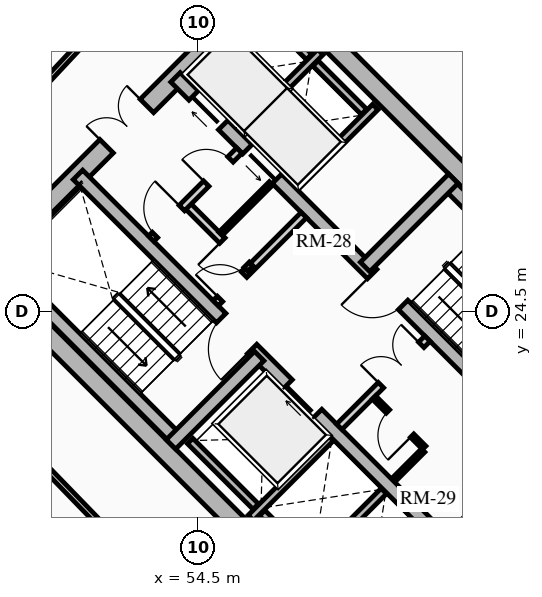
"""IFC4 building model, lengths in metres.
Left out: names, types, materials, properties, quantities, classifications, styles, units other than length and angle.
Written with IfcOpenShell. Run it as: python <this file> out.ifc"""

import sys

from ifc_helpers import new_model, si_unit, direction, frame, frame_2d, origin, place, context, subcontext, project, spatial, rectangle, extrude, source, transform, mapped, element, fill, save


model = new_model("IFC4")
c1 = context("Model", 3, precision=1e-05, world=origin(), true_north=direction((0.0, 1.0)))
c2 = subcontext(c1, "Body", "Model", "MODEL_VIEW")
j1 = project(units=[si_unit("LENGTHUNIT", "METRE"), si_unit("PLANEANGLEUNIT", "RADIAN")], contexts=[c1])
p1 = place(None, origin())
s1 = spatial("IfcSite", under=j1, at=p1, CompositionType="ELEMENT")
p2 = place(p1, origin())
s2 = spatial("IfcBuilding", under=s1, at=p2, CompositionType="ELEMENT")
p3 = place(p2, frame((0.0, 0.0, 54.01)))
s3 = spatial("IfcBuildingStorey", under=s2, at=p3, CompositionType="ELEMENT", Elevation=54.01)
for number, where, z_axis, x_axis in (
    (1, (58.773, 15.661, 0.0), (0.0, 0.0, 1.0), (-0.707, 0.707, 0.0)),
    (2, (66.339, 23.227, 0.0), (0.0, 0.0, 1.0), (-0.707, 0.707, 0.0)),
):
    element("IfcWall", number, at=place(p3, frame(where, z_axis=z_axis, x_axis=x_axis)), inside=s3, PredefinedType="SHEAR", context=c2, shape_type="SweptSolid", body=[
        extrude(rectangle(XDim=14.3, YDim=0.5, at=frame_2d((7.15, 0.0))), origin(), (0.0, 0.0, 1.0), 2.91),
    ])
p4 = place(p3, frame((58.596, 15.838, 0.0), z_axis=(0.0, 0.0, 1.0), x_axis=(0.707106781187, 0.707106781187, 0.0)))
e3 = element("IfcWall", 3, at=p4, inside=s3, PredefinedType="SHEAR", context=c2, shape_type="SweptSolid", body=[
    extrude(rectangle(XDim=10.7, YDim=0.5, at=frame_2d((5.35, 0.0))), origin(), (0.0, 0.0, 1.0), 2.91),
])
m1 = source(origin(), c2, "Body", "SweptSolid", [
    extrude(rectangle(XDim=1.5, YDim=2.02, at=frame_2d((0.75, 1.01))), frame((0.0, 0.26, 0.0), z_axis=(0.0, -1.0, 0.0), x_axis=(1.0, 0.0, 0.0)), (0.0, 0.0, 1.0), 0.52),
])
p5 = place(p4, frame((5.45, 0.0, 0.0)))
e4 = element("IfcOpeningElement", 4, at=p5, cuts=e3, PredefinedType="OPENING", context=c2, shape_type="MappedRepresentation", body=[
    mapped(m1, transform((0.0, 0.0, 0.0), x_axis=(1.0, 0.0, 0.0), y_axis=(0.0, 1.0, 0.0), z_axis=(0.0, 0.0, 1.0), scale=1.0)),
])
p6 = place(p3, frame((48.838, 25.596, 0.0), z_axis=(0.0, 0.0, 1.0), x_axis=(0.707106781187, 0.707106781187, 0.0)))
e5 = element("IfcWall", 5, at=p6, inside=s3, PredefinedType="SHEAR", context=c2, shape_type="SweptSolid", body=[
    extrude(rectangle(XDim=10.7, YDim=0.5, at=frame_2d((5.35, 0.0))), origin(), (0.0, 0.0, 1.0), 2.91),
])
p7 = place(p6, frame((4.6, 0.0, 0.0)))
e6 = element("IfcOpeningElement", 6, at=p7, cuts=e5, PredefinedType="OPENING", context=c2, shape_type="MappedRepresentation", body=[
    mapped(m1, transform((0.0, 0.0, 0.0), x_axis=(1.0, 0.0, 0.0), y_axis=(0.0, 1.0, 0.0), z_axis=(0.0, 0.0, 1.0), scale=1.0)),
])
p8 = place(p3, frame((61.096, 18.338, 0.0), z_axis=(0.0, 0.0, 1.0), x_axis=(-0.707106781187, 0.707106781187, 0.0)))
e7 = element("IfcWall", 7, at=p8, inside=s3, PredefinedType="SHEAR", context=c2, shape_type="SweptSolid", body=[
    extrude(rectangle(XDim=13.8, YDim=0.35, at=frame_2d((6.9, 0.0))), origin(), (0.0, 0.0, 1.0), 2.91),
])
m2 = source(origin(), c2, "Body", "SweptSolid", [
    extrude(rectangle(XDim=1.1, YDim=2.015, at=frame_2d((0.55, 1.007))), frame((0.0, 0.185, 0.0), z_axis=(0.0, -1.0, 0.0), x_axis=(1.0, 0.0, 0.0)), (0.0, 0.0, 1.0), 0.37),
])
p9 = place(p8, frame((4.9, 0.0, 0.0)))
e8 = element("IfcOpeningElement", 8, at=p9, cuts=e7, PredefinedType="OPENING", context=c2, shape_type="MappedRepresentation", body=[
    mapped(m2, transform((0.0, 0.0, 0.0), x_axis=(1.0, 0.0, 0.0), y_axis=(0.0, 1.0, 0.0), z_axis=(0.0, 0.0, 1.0), scale=1.0)),
])
m3 = source(origin(), c2, "Body", "SweptSolid", [
    extrude(rectangle(XDim=1.15, YDim=2.02, at=frame_2d((0.575, 1.01))), frame((0.0, 0.185, 0.0), z_axis=(0.0, -1.0, 0.0), x_axis=(1.0, 0.0, 0.0)), (0.0, 0.0, 1.0), 0.37),
])
p10 = place(p8, frame((7.32, 0.0, 0.0)))
e9 = element("IfcOpeningElement", 9, at=p10, cuts=e7, PredefinedType="OPENING", context=c2, shape_type="MappedRepresentation", body=[
    mapped(m3, transform((0.0, 0.0, 0.0), x_axis=(1.0, 0.0, 0.0), y_axis=(0.0, 1.0, 0.0), z_axis=(0.0, 0.0, 1.0), scale=1.0)),
])
p11 = place(p3, frame((63.662, 20.904, 0.0), z_axis=(0.0, 0.0, 1.0), x_axis=(-0.707106781187, 0.707106781187, 0.0)))
e10 = element("IfcWall", 10, at=p11, inside=s3, PredefinedType="SHEAR", context=c2, shape_type="SweptSolid", body=[
    extrude(rectangle(XDim=13.8, YDim=0.35, at=frame_2d((6.9, 0.0))), origin(), (0.0, 0.0, 1.0), 2.91),
])
p12 = place(p11, frame((10.025, 0.0, 0.0)))
e11 = element("IfcOpeningElement", 11, at=p12, cuts=e10, PredefinedType="OPENING", context=c2, shape_type="MappedRepresentation", body=[
    mapped(m2, transform((0.0, 0.0, 0.0), x_axis=(1.0, 0.0, 0.0), y_axis=(0.0, 1.0, 0.0), z_axis=(0.0, 0.0, 1.0), scale=1.0)),
])
p13 = place(p11, frame((12.025, 0.0, 0.0)))
e12 = element("IfcOpeningElement", 12, at=p13, cuts=e10, PredefinedType="OPENING", context=c2, shape_type="MappedRepresentation", body=[
    mapped(m2, transform((0.0, 0.0, 0.0), x_axis=(1.0, 0.0, 0.0), y_axis=(0.0, 1.0, 0.0), z_axis=(0.0, 0.0, 1.0), scale=1.0)),
])
p14 = place(p11, frame((5.33, 0.0, 0.0)))
e13 = element("IfcOpeningElement", 13, at=p14, cuts=e10, PredefinedType="OPENING", context=c2, shape_type="MappedRepresentation", body=[
    mapped(m3, transform((0.0, 0.0, 0.0), x_axis=(1.0, 0.0, 0.0), y_axis=(0.0, 1.0, 0.0), z_axis=(0.0, 0.0, 1.0), scale=1.0)),
])
p15 = place(p3, frame((53.922, 21.141, 0.0), z_axis=(0.0, 0.0, 1.0), x_axis=(-0.707106781187, 0.707106781187, 0.0)))
e14 = element("IfcWall", 14, at=p15, inside=s3, PredefinedType="SHEAR", context=c2, shape_type="SweptSolid", body=[
    extrude(rectangle(XDim=6.745, YDim=0.35, at=frame_2d((3.373, 0.0))), origin(), (0.0, 0.0, 1.0), 2.91),
])
p16 = place(p3, frame((53.784, 21.003, 0.0), z_axis=(0.0, 0.0, 1.0), x_axis=(0.707106781187, 0.707106781187, 0.0)))
e15 = element("IfcWall", 15, at=p16, inside=s3, PredefinedType="SHEAR", context=c2, shape_type="SweptSolid", body=[
    extrude(rectangle(XDim=3.285, YDim=0.35, at=frame_2d((1.643, 0.0))), origin(), (0.0, 0.0, 1.0), 2.91),
])
p17 = place(p3, frame((65.847, 23.089, 0.0), z_axis=(0.0, 0.0, 1.0), x_axis=(-0.707106781187, 0.707106781187, 0.0)))
e16 = element("IfcWall", 16, at=p17, inside=s3, PredefinedType="SHEAR", context=c2, shape_type="SweptSolid", body=[
    extrude(rectangle(XDim=6.745, YDim=0.35, at=frame_2d((3.373, 0.0))), origin(), (0.0, 0.0, 1.0), 2.91),
])
p18 = place(p3, frame((58.893, 25.674, 0.0), z_axis=(0.0, 0.0, 1.0), x_axis=(0.707106781187, 0.707106781187, 0.0)))
e17 = element("IfcWall", 17, at=p18, inside=s3, PredefinedType="SHEAR", context=c2, shape_type="SweptSolid", body=[
    extrude(rectangle(XDim=3.285, YDim=0.35, at=frame_2d((1.643, 0.0))), origin(), (0.0, 0.0, 1.0), 2.91),
])
p19 = place(p3, frame((55.888, 19.069, 0.0), z_axis=(0.0, 0.0, 1.0), x_axis=(0.707106781187, 0.707106781187, 0.0)))
e18 = element("IfcWall", 18, at=p19, inside=s3, PredefinedType="SHEAR", context=c2, shape_type="SweptSolid", body=[
    extrude(rectangle(XDim=2.97, YDim=0.2, at=frame_2d((1.485, 0.0))), origin(), (0.0, 0.0, 1.0), 2.91),
])
p20 = place(p3, frame((56.015, 19.366, 0.0), z_axis=(0.0, 0.0, 1.0), x_axis=(-0.707106781187, 0.707106781187, 0.0)))
e19 = element("IfcWall", 19, at=p20, inside=s3, PredefinedType="SHEAR", context=c2, shape_type="SweptSolid", body=[
    extrude(rectangle(XDim=2.44, YDim=0.2, at=frame_2d((1.22, 0.0))), origin(), (0.0, 0.0, 1.0), 2.91),
])
p21 = place(p3, frame((57.284, 17.673, 0.0), z_axis=(0.0, 0.0, 1.0), x_axis=(0.707147878904, 0.70706568108, 0.0)))
e20 = element("IfcWall", 20, at=p21, inside=s3, PredefinedType="SHEAR", context=c2, shape_type="SweptSolid", body=[
    extrude(rectangle(XDim=2.97, YDim=0.2, at=frame_2d((1.485, 0.0))), origin(), (0.0, 0.0, 1.0), 2.91),
])
p22 = place(p3, frame((57.412, 17.97, 0.0), z_axis=(0.0, 0.0, 1.0), x_axis=(-0.707106781187, 0.707106781187, 0.0)))
e21 = element("IfcWall", 21, at=p22, inside=s3, PredefinedType="SHEAR", context=c2, shape_type="SweptSolid", body=[
    extrude(rectangle(XDim=1.735, YDim=0.2, at=frame_2d((0.867, 0.0))), origin(), (0.0, 0.0, 1.0), 2.91),
])
p23 = place(p3, frame((57.062, 27.781, 0.0), z_axis=(0.0, 0.0, 1.0), x_axis=(0.707106781187, 0.707106781187, 0.0)))
e22 = element("IfcWall", 22, at=p23, inside=s3, PredefinedType="SHEAR", context=c2, shape_type="SweptSolid", body=[
    extrude(rectangle(XDim=2.97, YDim=0.2, at=frame_2d((1.485, 0.0))), origin(), (0.0, 0.0, 1.0), 2.91),
])
p24 = place(p3, frame((55.615, 29.227, 0.0), z_axis=(0.0, 0.0, 1.0), x_axis=(0.707147878904, 0.70706568108, 0.0)))
e23 = element("IfcWall", 23, at=p24, inside=s3, PredefinedType="SHEAR", context=c2, shape_type="SweptSolid", body=[
    extrude(rectangle(XDim=2.97, YDim=0.2, at=frame_2d((1.485, 0.0))), origin(), (0.0, 0.0, 1.0), 2.91),
])
p25 = place(p3, frame((58.865, 29.754, 0.0), z_axis=(0.0, 0.0, 1.0), x_axis=(-0.707174411312, 0.707039144592, 0.0)))
e24 = element("IfcWall", 24, at=p25, inside=s3, PredefinedType="SHEAR", context=c2, shape_type="SweptSolid", body=[
    extrude(rectangle(XDim=1.805, YDim=0.2, at=frame_2d((0.902, 0.0))), origin(), (0.0, 0.0, 1.0), 2.91),
])
p26 = place(p3, frame((57.419, 31.2, 0.0), z_axis=(0.0, 0.0, 1.0), x_axis=(-0.707032117043, 0.707181437447, 0.0)))
e25 = element("IfcWall", 25, at=p26, inside=s3, PredefinedType="SHEAR", context=c2, shape_type="SweptSolid", body=[
    extrude(rectangle(XDim=1.635, YDim=0.2, at=frame_2d((0.817, 0.0))), origin(), (0.0, 0.0, 1.0), 2.91),
])
p27 = place(p3, frame((58.214, 21.467, 0.0), z_axis=(0.0, 0.0, 1.0), x_axis=(0.707106781187, 0.707106781187, 0.0)))
e26 = element("IfcWall", 26, at=p27, inside=s3, PredefinedType="PARTITIONING", context=c2, shape_type="SweptSolid", body=[
    extrude(rectangle(XDim=3.28, YDim=0.2, at=frame_2d((1.64, 0.0))), origin(), (0.0, 0.0, 1.0), 2.635),
])
m4 = source(origin(), c2, "Body", "SweptSolid", [
    extrude(rectangle(XDim=1.5, YDim=2.02, at=frame_2d((0.75, 1.01))), frame((0.0, 0.11, 0.0), z_axis=(0.0, -1.0, 0.0), x_axis=(1.0, 0.0, 0.0)), (0.0, 0.0, 1.0), 0.22),
])
p28 = place(p27, frame((1.55, 0.0, 0.0)))
e27 = element("IfcOpeningElement", 27, at=p28, cuts=e26, PredefinedType="OPENING", context=c2, shape_type="MappedRepresentation", body=[
    mapped(m4, transform((0.0, 0.0, 0.0), x_axis=(1.0, 0.0, 0.0), y_axis=(0.0, 1.0, 0.0), z_axis=(0.0, 0.0, 1.0), scale=1.0)),
])
p29 = place(p3, frame((54.961, 24.719, 0.0), z_axis=(0.0, 0.0, 1.0), x_axis=(0.707106781187, 0.707106781187, 0.0)))
e28 = element("IfcWall", 28, at=p29, inside=s3, PredefinedType="PARTITIONING", context=c2, shape_type="SweptSolid", body=[
    extrude(rectangle(XDim=3.28, YDim=0.2, at=frame_2d((1.64, 0.0))), origin(), (0.0, 0.0, 1.0), 2.635),
])
m5 = source(origin(), c2, "Body", "SweptSolid", [
    extrude(rectangle(XDim=0.9, YDim=2.005, at=frame_2d((0.45, 1.002))), frame((0.0, 0.11, 0.0), z_axis=(0.0, -1.0, 0.0), x_axis=(1.0, 0.0, 0.0)), (0.0, 0.0, 1.0), 0.22),
])
p30 = place(p29, frame((0.16, 0.0, 0.0)))
e29 = element("IfcOpeningElement", 29, at=p30, cuts=e28, PredefinedType="OPENING", context=c2, shape_type="MappedRepresentation", body=[
    mapped(m5, transform((0.0, 0.0, 0.0), x_axis=(1.0, 0.0, 0.0), y_axis=(0.0, 1.0, 0.0), z_axis=(0.0, 0.0, 1.0), scale=1.0)),
])
p31 = place(p3, frame((55.874, 25.631, 0.0), z_axis=(0.0, 0.0, 1.0), x_axis=(-0.707157639372, 0.707055919343, 0.0)))
e30 = element("IfcWall", 30, at=p31, inside=s3, PredefinedType="PARTITIONING", context=c2, shape_type="SweptSolid", body=[
    extrude(rectangle(XDim=2.4, YDim=0.2, at=frame_2d((1.2, 0.0))), origin(), (0.0, 0.0, 1.0), 2.635),
])
p32 = place(p31, frame((0.14, 0.0, 0.0)))
e31 = element("IfcOpeningElement", 31, at=p32, cuts=e30, PredefinedType="OPENING", context=c2, shape_type="MappedRepresentation", body=[
    mapped(m5, transform((0.0, 0.0, 0.0), x_axis=(1.0, 0.0, 0.0), y_axis=(0.0, 1.0, 0.0), z_axis=(0.0, 0.0, 1.0), scale=1.0)),
])
p33 = place(p3, frame((53.264, 26.416, 0.0), z_axis=(0.0, 0.0, 1.0), x_axis=(0.707106781187, 0.707106781187, 0.0)))
e32 = element("IfcWall", 32, at=p33, inside=s3, PredefinedType="PARTITIONING", context=c2, shape_type="SweptSolid", body=[
    extrude(rectangle(XDim=3.28, YDim=0.2, at=frame_2d((1.64, 0.0))), origin(), (0.0, 0.0, 1.0), 2.635),
])
m6 = source(origin(), c2, "Body", "SweptSolid", [
    extrude(rectangle(XDim=1.0, YDim=2.015, at=frame_2d((0.5, 1.007))), frame((0.0, 0.11, 0.0), z_axis=(0.0, -1.0, 0.0), x_axis=(1.0, 0.0, 0.0)), (0.0, 0.0, 1.0), 0.22),
])
p34 = place(p33, frame((0.14, 0.0, 0.0)))
e33 = element("IfcOpeningElement", 33, at=p34, cuts=e32, PredefinedType="OPENING", context=c2, shape_type="MappedRepresentation", body=[
    mapped(m6, transform((0.0, 0.0, 0.0), x_axis=(1.0, 0.0, 0.0), y_axis=(0.0, 1.0, 0.0), z_axis=(0.0, 0.0, 1.0), scale=1.0)),
])
p35 = place(p33, frame((2.05, 0.0, 0.0)))
e34 = element("IfcOpeningElement", 34, at=p35, cuts=e32, PredefinedType="OPENING", context=c2, shape_type="MappedRepresentation", body=[
    mapped(m5, transform((0.0, 0.0, 0.0), x_axis=(1.0, 0.0, 0.0), y_axis=(0.0, 1.0, 0.0), z_axis=(0.0, 0.0, 1.0), scale=1.0)),
])
p36 = place(p3, frame((60.448, 20.915, 0.0), z_axis=(0.0, 0.0, 1.0), x_axis=(-0.707106781187, 0.707106781187, 0.0)))
e35 = element("IfcWall", 35, at=p36, inside=s3, PredefinedType="PARTITIONING", context=c2, shape_type="SweptSolid", body=[
    extrude(rectangle(XDim=1.87, YDim=0.125, at=frame_2d((0.935, 0.0))), origin(), (0.0, 0.0, 1.0), 2.635),
])
m7 = source(origin(), c2, "Body", "SweptSolid", [
    extrude(rectangle(XDim=0.9, YDim=2.005, at=frame_2d((0.45, 1.002))), frame((0.0, 0.073, 0.0), z_axis=(0.0, -1.0, 0.0), x_axis=(1.0, 0.0, 0.0)), (0.0, 0.0, 1.0), 0.145),
])
p37 = place(p36, frame((0.45, 0.0, 0.0)))
e36 = element("IfcOpeningElement", 36, at=p37, cuts=e35, PredefinedType="OPENING", context=c2, shape_type="MappedRepresentation", body=[
    mapped(m7, transform((0.0, 0.0, 0.0), x_axis=(1.0, 0.0, 0.0), y_axis=(0.0, 1.0, 0.0), z_axis=(0.0, 0.0, 1.0), scale=1.0)),
])
p38 = place(p3, frame((59.643, 20.066, 0.0), z_axis=(0.0, 0.0, 1.0), x_axis=(0.707106781187, 0.707106781187, 0.0)))
e37 = element("IfcWall", 37, at=p38, inside=s3, PredefinedType="PARTITIONING", context=c2, shape_type="SweptSolid", body=[
    extrude(rectangle(XDim=1.1, YDim=0.125, at=frame_2d((0.55, 0.0))), origin(), (0.0, 0.0, 1.0), 2.635),
])
p39 = place(p3, frame((55.089, 26.543, 0.0), z_axis=(0.0, 0.0, 1.0), x_axis=(0.707106781187, 0.707106781187, 0.0)))
e38 = element("IfcWall", 38, at=p39, inside=s3, PredefinedType="PARTITIONING", context=c2, shape_type="SweptSolid", body=[
    extrude(rectangle(XDim=1.88, YDim=0.125, at=frame_2d((0.94, 0.0))), origin(), (0.0, 0.0, 1.0), 2.635),
])
p40 = place(p3, frame((63.086, 30.086, 0.0), z_axis=(0.0, 0.0, 1.0), x_axis=(-0.699032802832, 0.715089603172, 0.0)))
e39 = element("IfcWall", 39, at=p40, inside=s3, PredefinedType="PARTITIONING", context=c2, shape_type="SweptSolid", body=[
    extrude(rectangle(XDim=6.082, YDim=0.15, at=frame_2d((3.041, 0.0))), origin(), (0.0, 0.0, 1.0), 2.159),
])
m8 = source(origin(), c2, "Body", "SweptSolid", [
    extrude(rectangle(XDim=1.05, YDim=2.015, at=frame_2d((0.525, 1.007))), frame((0.0, 0.085, 0.0), z_axis=(0.0, -1.0, 0.0), x_axis=(1.0, 0.0, 0.0)), (0.0, 0.0, 1.0), 0.17),
])
p41 = place(p40, frame((2.516, 0.0, 0.0)))
e40 = element("IfcOpeningElement", 40, at=p41, cuts=e39, PredefinedType="OPENING", context=c2, shape_type="MappedRepresentation", body=[
    mapped(m8, transform((0.0, 0.0, 0.0), x_axis=(1.0, 0.0, 0.0), y_axis=(0.0, 1.0, 0.0), z_axis=(0.0, 0.0, 1.0), scale=1.0)),
])
p42 = place(p3, frame((52.079, 32.244, 0.0), z_axis=(0.0, 0.0, 1.0), x_axis=(-0.682703325574, -0.730695674854, 0.0)))
e41 = element("IfcWall", 41, at=p42, inside=s3, PredefinedType="PARTITIONING", context=c2, shape_type="SweptSolid", body=[
    extrude(rectangle(XDim=6.527, YDim=0.15, at=frame_2d((3.263, 0.0))), origin(), (0.0, 0.0, 1.0), 2.159),
])
p43 = place(p3, frame((47.729, 23.23, 0.0), z_axis=(0.0, 0.0, 1.0), x_axis=(0.696119834292, -0.717925606386, 0.0)))
e42 = element("IfcWall", 42, at=p43, inside=s3, PredefinedType="PARTITIONING", context=c2, shape_type="SweptSolid", body=[
    extrude(rectangle(XDim=6.012, YDim=0.15, at=frame_2d((3.006, 0.0))), origin(), (0.0, 0.0, 1.0), 2.635),
])
m9 = source(origin(), c2, "Body", "SweptSolid", [
    extrude(rectangle(XDim=1.1, YDim=2.015, at=frame_2d((0.55, 1.007))), frame((0.0, 0.025, 0.0), z_axis=(0.0, -1.0, 0.0), x_axis=(1.0, 0.0, 0.0)), (0.0, 0.0, 1.0), 0.05),
])
p44 = place(p9, origin())
e43 = element("IfcDoor", 43, at=p44, inside=s3, OperationType="SLIDING_TO_RIGHT", PredefinedType="DOOR", context=c2, shape_type="MappedRepresentation", body=[
    mapped(m9, transform((0.0, 0.0, 0.0), x_axis=(1.0, 0.0, 0.0), y_axis=(0.0, 1.0, 0.0), z_axis=(0.0, 0.0, 1.0), scale=1.0)),
])
fill(e8, e43)
p45 = place(p12, origin())
e44 = element("IfcDoor", 44, at=p45, inside=s3, OperationType="SLIDING_TO_LEFT", PredefinedType="DOOR", context=c2, shape_type="MappedRepresentation", body=[
    mapped(m9, transform((0.0, 0.0, 0.0), x_axis=(1.0, 0.0, 0.0), y_axis=(0.0, 1.0, 0.0), z_axis=(0.0, 0.0, 1.0), scale=1.0)),
])
fill(e11, e44)
p46 = place(p13, origin())
e45 = element("IfcDoor", 45, at=p46, inside=s3, OperationType="SLIDING_TO_RIGHT", PredefinedType="DOOR", context=c2, shape_type="MappedRepresentation", body=[
    mapped(m9, transform((0.0, 0.0, 0.0), x_axis=(1.0, 0.0, 0.0), y_axis=(0.0, 1.0, 0.0), z_axis=(0.0, 0.0, 1.0), scale=1.0)),
])
fill(e12, e45)
m10 = source(origin(), c2, "Body", "SweptSolid", [
    extrude(rectangle(XDim=1.15, YDim=2.02, at=frame_2d((0.575, 1.01))), frame((0.0, 0.025, 0.0), z_axis=(0.0, -1.0, 0.0), x_axis=(1.0, 0.0, 0.0)), (0.0, 0.0, 1.0), 0.05),
])
p47 = place(p10, origin())
e46 = element("IfcDoor", 46, at=p47, inside=s3, OperationType="SINGLE_SWING_LEFT", PredefinedType="DOOR", context=c2, shape_type="MappedRepresentation", body=[
    mapped(m10, transform((0.0, 0.0, 0.0), x_axis=(1.0, 0.0, 0.0), y_axis=(0.0, 1.0, 0.0), z_axis=(0.0, 0.0, 1.0), scale=1.0)),
])
fill(e9, e46)
p48 = place(p14, origin())
e47 = element("IfcDoor", 47, at=p48, inside=s3, OperationType="SINGLE_SWING_RIGHT", PredefinedType="DOOR", context=c2, shape_type="MappedRepresentation", body=[
    mapped(m10, transform((0.0, 0.0, 0.0), x_axis=(1.0, 0.0, 0.0), y_axis=(0.0, 1.0, 0.0), z_axis=(0.0, 0.0, 1.0), scale=1.0)),
])
fill(e13, e47)
m11 = source(origin(), c2, "Body", "SweptSolid", [
    extrude(rectangle(XDim=1.5, YDim=2.02, at=frame_2d((0.75, 1.01))), frame((0.0, 0.025, 0.0), z_axis=(0.0, -1.0, 0.0), x_axis=(1.0, 0.0, 0.0)), (0.0, 0.0, 1.0), 0.05),
])
p49 = place(p7, origin())
e48 = element("IfcDoor", 48, at=p49, inside=s3, OperationType="DOUBLE_DOOR_SINGLE_SWING", PredefinedType="DOOR", context=c2, shape_type="MappedRepresentation", body=[
    mapped(m11, transform((0.0, 0.0, 0.0), x_axis=(1.0, 0.0, 0.0), y_axis=(0.0, 1.0, 0.0), z_axis=(0.0, 0.0, 1.0), scale=1.0)),
])
fill(e6, e48)
p50 = place(p28, origin())
e49 = element("IfcDoor", 49, at=p50, inside=s3, OperationType="DOUBLE_DOOR_SINGLE_SWING", PredefinedType="DOOR", context=c2, shape_type="MappedRepresentation", body=[
    mapped(m11, transform((0.0, 0.0, 0.0), x_axis=(1.0, 0.0, 0.0), y_axis=(0.0, 1.0, 0.0), z_axis=(0.0, 0.0, 1.0), scale=1.0)),
])
fill(e27, e49)
m12 = source(origin(), c2, "Body", "SweptSolid", [
    extrude(rectangle(XDim=0.9, YDim=2.005, at=frame_2d((0.45, 1.002))), frame((0.0, 0.025, 0.0), z_axis=(0.0, -1.0, 0.0), x_axis=(1.0, 0.0, 0.0)), (0.0, 0.0, 1.0), 0.05),
])
p51 = place(p30, origin())
e50 = element("IfcDoor", 50, at=p51, inside=s3, OperationType="SINGLE_SWING_LEFT", PredefinedType="DOOR", context=c2, shape_type="MappedRepresentation", body=[
    mapped(m12, transform((0.0, 0.0, 0.0), x_axis=(1.0, 0.0, 0.0), y_axis=(0.0, 1.0, 0.0), z_axis=(0.0, 0.0, 1.0), scale=1.0)),
])
fill(e29, e50)
m13 = source(origin(), c2, "Body", "SweptSolid", [
    extrude(rectangle(XDim=1.0, YDim=2.015, at=frame_2d((0.5, 1.007))), frame((0.0, 0.025, 0.0), z_axis=(0.0, -1.0, 0.0), x_axis=(1.0, 0.0, 0.0)), (0.0, 0.0, 1.0), 0.05),
])
p52 = place(p34, origin())
e51 = element("IfcDoor", 51, at=p52, inside=s3, OperationType="SINGLE_SWING_RIGHT", PredefinedType="DOOR", context=c2, shape_type="MappedRepresentation", body=[
    mapped(m13, transform((0.0, 0.0, 0.0), x_axis=(1.0, 0.0, 0.0), y_axis=(0.0, 1.0, 0.0), z_axis=(0.0, 0.0, 1.0), scale=1.0)),
])
fill(e33, e51)
p53 = place(p37, origin())
e52 = element("IfcDoor", 52, at=p53, inside=s3, OperationType="SINGLE_SWING_LEFT", PredefinedType="DOOR", context=c2, shape_type="MappedRepresentation", body=[
    mapped(m12, transform((0.0, 0.0, 0.0), x_axis=(1.0, 0.0, 0.0), y_axis=(0.0, 1.0, 0.0), z_axis=(0.0, 0.0, 1.0), scale=1.0)),
])
fill(e36, e52)
p54 = place(p32, origin())
e53 = element("IfcDoor", 53, at=p54, inside=s3, OperationType="SINGLE_SWING_RIGHT", PredefinedType="DOOR", context=c2, shape_type="MappedRepresentation", body=[
    mapped(m12, transform((0.0, 0.0, 0.0), x_axis=(1.0, 0.0, 0.0), y_axis=(0.0, 1.0, 0.0), z_axis=(0.0, 0.0, 1.0), scale=1.0)),
])
fill(e31, e53)
p55 = place(p35, origin())
e54 = element("IfcDoor", 54, at=p55, inside=s3, OperationType="SINGLE_SWING_LEFT", PredefinedType="DOOR", context=c2, shape_type="MappedRepresentation", body=[
    mapped(m12, transform((0.0, 0.0, 0.0), x_axis=(1.0, 0.0, 0.0), y_axis=(0.0, 1.0, 0.0), z_axis=(0.0, 0.0, 1.0), scale=1.0)),
])
fill(e34, e54)
save(model, sys.argv[1])
